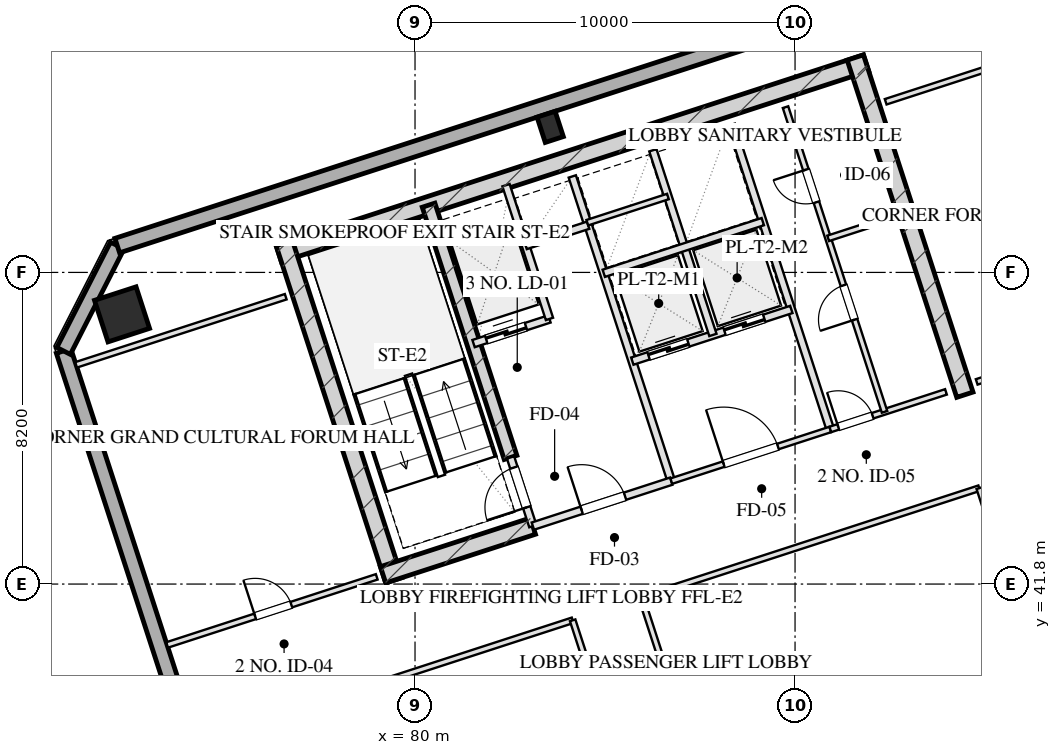
"""IFC4 building model, lengths in metres.
Left out: names, types, materials, properties, quantities, classifications, styles, units other than length and angle.
Written with IfcOpenShell. Run it as: python <this file> out.ifc"""

import sys

from ifc_helpers import new_model, si_unit, direction, frame, frame_2d, origin, origin_2d, place, context, subcontext, project, spatial, rectangle, hollow_rectangle, extrude, element, fill, save


model = new_model("IFC4")
c1 = context("Model", 3, precision=1e-05, world=origin(), true_north=direction((0.0, 1.0)))
c2 = subcontext(c1, "Body", "Model", "MODEL_VIEW")
j1 = project(units=[si_unit("LENGTHUNIT", "METRE"), si_unit("PLANEANGLEUNIT", "RADIAN")], contexts=[c1])
p1 = place(None, origin())
s1 = spatial("IfcSite", under=j1, at=p1, CompositionType="ELEMENT")
p2 = place(p1, origin())
s2 = spatial("IfcBuilding", under=s1, at=p2, CompositionType="ELEMENT")
p3 = place(p2, frame((0.0, 0.0, 198.95)))
s3 = spatial("IfcBuildingStorey", under=s2, at=p3, CompositionType="ELEMENT", Elevation=198.95)
p4 = place(p3, frame((76.415, 50.489, 0.0), z_axis=(0.0, 0.0, 1.0), x_axis=(0.951056810414, 0.309016089169, 0.0)))
e1 = element("IfcWall", 1, at=p4, inside=s3, PredefinedType="SHEAR", context=c2, shape_type="SweptSolid", body=[
    extrude(rectangle(XDim=16.25, YDim=0.45, at=frame_2d((8.125, 0.0))), origin(), (0.0, 0.0, 1.0), 3.45),
])
for number, where, z_axis, x_axis in (
    (2, (79.442, 41.899, 0.0), (0.0, 0.0, 1.0), (-0.309, 0.951, 0.0)),
    (3, (94.469, 46.781, 0.0), (0.0, 0.0, 1.0), (-0.309, 0.951, 0.0)),
):
    element("IfcWall", number, at=place(p3, frame(where, z_axis=z_axis, x_axis=x_axis)), inside=s3, PredefinedType="SHEAR", context=c2, shape_type="SweptSolid", body=[
        extrude(rectangle(XDim=9.33, YDim=0.45, at=frame_2d((4.665, 0.0))), origin(), (0.0, 0.0, 1.0), 3.45),
    ])
p5 = place(p3, frame((82.514, 45.131, 0.0), z_axis=(0.0, 0.0, 1.0), x_axis=(-0.308988790936, 0.951065679686, 0.0)))
e4 = element("IfcWall", 4, at=p5, inside=s3, PredefinedType="SHEAR", context=c2, shape_type="SweptSolid", body=[
    extrude(rectangle(XDim=6.98, YDim=0.35, at=frame_2d((3.49, 0.0))), origin(), (0.0, 0.0, 1.0), 3.45),
])
p6 = place(p3, frame((79.159, 42.043, 0.0), z_axis=(0.0, 0.0, 1.0), x_axis=(0.951047485828, 0.309044785913, 0.0)))
e5 = element("IfcWall", 5, at=p6, inside=s3, PredefinedType="SHEAR", context=c2, shape_type="SweptSolid", body=[
    extrude(rectangle(XDim=4.145, YDim=0.45, at=frame_2d((2.073, 0.0))), origin(), (0.0, 0.0, 1.0), 3.45),
])
for number, where, z_axis, x_axis in (
    (6, (95.572, 56.461, 0.0), (0.0, 0.0, 1.0), (0.951, 0.309, 0.0)),
    (7, (72.29, 48.896, 0.0), (0.0, 0.0, 1.0), (0.951, 0.309, 0.0)),
):
    element("IfcColumn", number, at=place(p3, frame(where, z_axis=z_axis, x_axis=x_axis)), inside=s3, PredefinedType="COLUMN", context=c2, shape_type="SweptSolid", body=[
        extrude(hollow_rectangle(XDim=1.15, YDim=1.15, WallThickness=0.04, at=origin_2d()), origin(), (0.0, 0.0, 1.0), 3.451),
    ])
p7 = place(p3, frame((83.557, 53.83, 0.0), z_axis=(0.0, 0.0, 1.0), x_axis=(0.951056516295, 0.309016994375, 0.0)))
e8 = element("IfcColumn", 8, at=p7, inside=s3, PredefinedType="COLUMN", context=c2, shape_type="SweptSolid", body=[
    extrude(hollow_rectangle(XDim=0.5, YDim=0.7, WallThickness=0.025, at=origin_2d()), origin(), (0.0, 0.0, 1.0), 3.451),
])
p8 = place(p3, frame((82.618, 11.414, 0.0), z_axis=(0.0, 0.0, 1.0), x_axis=(-0.309016491071, 0.951056679828, 0.0)))
e9 = element("IfcWall", 9, at=p8, inside=s3, PredefinedType="SOLIDWALL", context=c2, shape_type="SweptSolid", body=[
    extrude(rectangle(XDim=38.4, YDim=0.4, at=frame_2d((19.2, 0.0))), origin(), (0.0, 0.0, 1.0), 2.61),
])
p9 = place(p8, frame((11.75, 0.0, 0.75)))
e10 = element("IfcOpeningElement", 10, at=p9, cuts=e9, PredefinedType="OPENING", context=c2, shape_type="SweptSolid", body=[
    extrude(rectangle(XDim=2.1, YDim=1.46, at=frame_2d((1.05, 0.73))), frame((0.0, 0.21, 0.0), z_axis=(0.0, -1.0, 0.0), x_axis=(1.0, 0.0, 0.0)), (0.0, 0.0, 1.0), 0.42),
])
p10 = place(p8, frame((15.55, 0.0, 0.75)))
e11 = element("IfcOpeningElement", 11, at=p10, cuts=e9, PredefinedType="OPENING", context=c2, shape_type="SweptSolid", body=[
    extrude(rectangle(XDim=2.1, YDim=1.46, at=frame_2d((1.05, 0.73))), frame((0.0, 0.21, 0.0), z_axis=(0.0, -1.0, 0.0), x_axis=(1.0, 0.0, 0.0)), (0.0, 0.0, 1.0), 0.42),
])
p11 = place(p8, frame((23.05, 0.0, 0.0)))
e12 = element("IfcOpeningElement", 12, at=p11, cuts=e9, PredefinedType="OPENING", context=c2, shape_type="SweptSolid", body=[
    extrude(rectangle(XDim=1.1, YDim=2.15, at=frame_2d((0.55, 1.075))), frame((0.0, 0.21, 0.0), z_axis=(0.0, -1.0, 0.0), x_axis=(1.0, 0.0, 0.0)), (0.0, 0.0, 1.0), 0.42),
])
p12 = place(p3, frame((70.752, 47.934, 0.0), z_axis=(0.0, 0.0, 1.0), x_axis=(0.453949291228, 0.891027519774, 0.0)))
e13 = element("IfcWall", 13, at=p12, inside=s3, PredefinedType="SOLIDWALL", context=c2, shape_type="SweptSolid", body=[
    extrude(rectangle(XDim=3.111, YDim=0.4, at=frame_2d((1.556, 0.0))), origin(), (0.0, 0.0, 1.0), 2.61),
])
p13 = place(p3, frame((72.165, 50.706, 0.0), z_axis=(0.0, 0.0, 1.0), x_axis=(0.951058012937, 0.309012388148, 0.0)))
e14 = element("IfcWall", 14, at=p13, inside=s3, PredefinedType="SOLIDWALL", context=c2, shape_type="SweptSolid", body=[
    extrude(rectangle(XDim=23.6, YDim=0.4, at=frame_2d((11.8, 0.0))), origin(), (0.0, 0.0, 1.0), 2.61),
])
p14 = place(p3, frame((83.101, 43.324, 0.0), z_axis=(0.0, 0.0, 1.0), x_axis=(-0.309048298632, 0.951046344356, 0.0)))
e15 = element("IfcWall", 15, at=p14, inside=s3, PredefinedType="PARTITIONING", context=c2, shape_type="SweptSolid", body=[
    extrude(rectangle(XDim=1.9, YDim=0.2, at=frame_2d((0.95, 0.0))), origin(), (0.0, 0.0, 1.0), 3.175),
])
p15 = place(p14, frame((0.52, 0.0, 0.0)))
e16 = element("IfcOpeningElement", 16, at=p15, cuts=e15, PredefinedType="OPENING", context=c2, shape_type="SweptSolid", body=[
    extrude(rectangle(XDim=1.1, YDim=2.05, at=frame_2d((0.55, 1.025))), frame((0.0, 0.11, 0.0), z_axis=(0.0, -1.0, 0.0), x_axis=(1.0, 0.0, 0.0)), (0.0, 0.0, 1.0), 0.22),
])
p16 = place(p3, frame((86.743, 44.508, 0.0), z_axis=(0.0, 0.0, 1.0), x_axis=(-0.309016001439, 0.951056838919, 0.0)))
e17 = element("IfcWall", 17, at=p16, inside=s3, PredefinedType="PARTITIONING", context=c2, shape_type="SweptSolid", body=[
    extrude(rectangle(XDim=8.43, YDim=0.2, at=frame_2d((4.215, 0.0))), origin(), (0.0, 0.0, 1.0), 3.175),
])
p17 = place(p3, frame((83.101, 43.324, 0.0), z_axis=(0.0, 0.0, 1.0), x_axis=(0.951052804469, 0.309028417967, 0.0)))
e18 = element("IfcWall", 18, at=p17, inside=s3, PredefinedType="PARTITIONING", context=c2, shape_type="SweptSolid", body=[
    extrude(rectangle(XDim=3.83, YDim=0.2, at=frame_2d((1.915, 0.0))), origin(), (0.0, 0.0, 1.0), 3.175),
])
p18 = place(p17, frame((1.35, 0.0, 0.0)))
e19 = element("IfcOpeningElement", 19, at=p18, cuts=e18, PredefinedType="OPENING", context=c2, shape_type="SweptSolid", body=[
    extrude(rectangle(XDim=1.2, YDim=2.05, at=frame_2d((0.6, 1.025))), frame((0.0, 0.11, 0.0), z_axis=(0.0, -1.0, 0.0), x_axis=(1.0, 0.0, 0.0)), (0.0, 0.0, 1.0), 0.22),
])
p19 = place(p3, frame((81.54, 48.127, 0.0), z_axis=(0.0, 0.0, 1.0), x_axis=(0.951062257173, 0.308999325213, 0.0)))
e20 = element("IfcWall", 20, at=p19, inside=s3, PredefinedType="PARTITIONING", context=c2, shape_type="SweptSolid", body=[
    extrude(rectangle(XDim=2.1, YDim=0.2, at=frame_2d((1.05, 0.0))), origin(), (0.0, 0.0, 1.0), 3.175),
])
p20 = place(p19, frame((0.35, 0.0, 0.0)))
e21 = element("IfcOpeningElement", 21, at=p20, cuts=e20, PredefinedType="OPENING", context=c2, shape_type="SweptSolid", body=[
    extrude(rectangle(XDim=1.1, YDim=2.05, at=frame_2d((0.55, 1.025))), frame((0.0, 0.11, 0.0), z_axis=(0.0, -1.0, 0.0), x_axis=(1.0, 0.0, 0.0)), (0.0, 0.0, 1.0), 0.22),
])
p21 = place(p3, frame((83.538, 48.776, 0.0), z_axis=(0.0, 0.0, 1.0), x_axis=(-0.3089935693, 0.951064127245, 0.0)))
e22 = element("IfcWall", 22, at=p21, inside=s3, PredefinedType="PARTITIONING", context=c2, shape_type="SweptSolid", body=[
    extrude(rectangle(XDim=3.7, YDim=0.2, at=frame_2d((1.85, 0.0))), origin(), (0.0, 0.0, 1.0), 3.175),
])
p22 = place(p3, frame((82.91, 50.707, 0.0), z_axis=(0.0, 0.0, 1.0), x_axis=(0.951041328149, 0.309063734775, 0.0)))
e23 = element("IfcWall", 23, at=p22, inside=s3, PredefinedType="PARTITIONING", context=c2, shape_type="SweptSolid", body=[
    extrude(rectangle(XDim=1.73, YDim=0.2, at=frame_2d((0.865, 0.0))), origin(), (0.0, 0.0, 1.0), 3.175),
])
p23 = place(p3, frame((90.928, 45.868, 0.0), z_axis=(0.0, 0.0, 1.0), x_axis=(-0.309042196757, 0.951048327176, 0.0)))
e24 = element("IfcWall", 24, at=p23, inside=s3, PredefinedType="PARTITIONING", context=c2, shape_type="SweptSolid", body=[
    extrude(rectangle(XDim=8.43, YDim=0.2, at=frame_2d((4.215, 0.0))), origin(), (0.0, 0.0, 1.0), 3.175),
])
p24 = place(p3, frame((86.743, 44.508, 0.0), z_axis=(0.0, 0.0, 1.0), x_axis=(0.951063829732, 0.308994485023, 0.0)))
e25 = element("IfcWall", 25, at=p24, inside=s3, PredefinedType="PARTITIONING", context=c2, shape_type="SweptSolid", body=[
    extrude(rectangle(XDim=4.4, YDim=0.15, at=frame_2d((2.2, 0.0))), origin(), (0.0, 0.0, 1.0), 3.175),
])
p25 = place(p24, frame((1.45, 0.0, 0.0)))
e26 = element("IfcOpeningElement", 26, at=p25, cuts=e25, PredefinedType="OPENING", context=c2, shape_type="SweptSolid", body=[
    extrude(rectangle(XDim=1.5, YDim=2.05, at=frame_2d((0.75, 1.025))), frame((0.0, 0.085, 0.0), z_axis=(0.0, -1.0, 0.0), x_axis=(1.0, 0.0, 0.0)), (0.0, 0.0, 1.0), 0.17),
])
p26 = place(p3, frame((85.718, 47.666, 0.0), z_axis=(0.0, 0.0, 1.0), x_axis=(0.951058531764, 0.30901079133, 0.0)))
e27 = element("IfcWall", 27, at=p26, inside=s3, PredefinedType="PARTITIONING", context=c2, shape_type="SweptSolid", body=[
    extrude(rectangle(XDim=4.4, YDim=0.2, at=frame_2d((2.2, 0.0))), origin(), (0.0, 0.0, 1.0), 3.175),
])
p27 = place(p26, frame((0.45, 0.0, 0.0)))
e28 = element("IfcOpeningElement", 28, at=p27, cuts=e27, PredefinedType="OPENING", context=c2, shape_type="SweptSolid", body=[
    extrude(rectangle(XDim=1.1, YDim=2.05, at=frame_2d((0.55, 1.025))), frame((0.0, 0.11, 0.0), z_axis=(0.0, -1.0, 0.0), x_axis=(1.0, 0.0, 0.0)), (0.0, 0.0, 1.0), 0.22),
])
p28 = place(p26, frame((2.55, 0.0, 0.0)))
e29 = element("IfcOpeningElement", 29, at=p28, cuts=e27, PredefinedType="OPENING", context=c2, shape_type="SweptSolid", body=[
    extrude(rectangle(XDim=1.1, YDim=2.05, at=frame_2d((0.55, 1.025))), frame((0.0, 0.11, 0.0), z_axis=(0.0, -1.0, 0.0), x_axis=(1.0, 0.0, 0.0)), (0.0, 0.0, 1.0), 0.22),
])
p29 = place(p3, frame((87.838, 48.354, 0.0), z_axis=(0.0, 0.0, 1.0), x_axis=(-0.3090093719, 0.951058992953, 0.0)))
e30 = element("IfcWall", 30, at=p29, inside=s3, PredefinedType="PARTITIONING", context=c2, shape_type="SweptSolid", body=[
    extrude(rectangle(XDim=5.11, YDim=0.2, at=frame_2d((2.555, 0.0))), origin(), (0.0, 0.0, 1.0), 3.175),
])
p30 = place(p3, frame((84.967, 49.977, 0.0), z_axis=(0.0, 0.0, 1.0), x_axis=(0.951063829732, 0.308994485023, 0.0)))
e31 = element("IfcWall", 31, at=p30, inside=s3, PredefinedType="PARTITIONING", context=c2, shape_type="SweptSolid", body=[
    extrude(rectangle(XDim=4.4, YDim=0.2, at=frame_2d((2.2, 0.0))), origin(), (0.0, 0.0, 1.0), 3.175),
])
p31 = place(p3, frame((84.534, 51.308, 0.0), z_axis=(0.0, 0.0, 1.0), x_axis=(0.951075093106, 0.308959814982, 0.0)))
e32 = element("IfcWall", 32, at=p31, inside=s3, PredefinedType="PARTITIONING", context=c2, shape_type="SweptSolid", body=[
    extrude(rectangle(XDim=2.23, YDim=0.15, at=frame_2d((1.115, 0.0))), origin(), (0.0, 0.0, 1.0), 3.175),
])
p32 = place(p3, frame((90.928, 45.868, 0.0), z_axis=(0.0, 0.0, 1.0), x_axis=(0.951059297078, 0.309008435874, 0.0)))
e33 = element("IfcWall", 33, at=p32, inside=s3, PredefinedType="PARTITIONING", context=c2, shape_type="SweptSolid", body=[
    extrude(rectangle(XDim=3.2, YDim=0.15, at=frame_2d((1.6, 0.0))), origin(), (0.0, 0.0, 1.0), 3.175),
])
p33 = place(p32, frame((0.22, 0.0, 0.0)))
e34 = element("IfcOpeningElement", 34, at=p33, cuts=e33, PredefinedType="OPENING", context=c2, shape_type="SweptSolid", body=[
    extrude(rectangle(XDim=0.95, YDim=2.05, at=frame_2d((0.475, 1.025))), frame((0.0, 0.085, 0.0), z_axis=(0.0, -1.0, 0.0), x_axis=(1.0, 0.0, 0.0)), (0.0, 0.0, 1.0), 0.17),
])
p34 = place(p3, frame((92.355, 46.331, 0.0), z_axis=(0.0, 0.0, 1.0), x_axis=(-0.309007490203, 0.951059604335, 0.0)))
e35 = element("IfcWall", 35, at=p34, inside=s3, PredefinedType="PARTITIONING", context=c2, shape_type="SweptSolid", body=[
    extrude(rectangle(XDim=8.43, YDim=0.15, at=frame_2d((4.215, 0.0))), origin(), (0.0, 0.0, 1.0), 3.175),
])
p35 = place(p34, frame((2.55, 0.0, 0.0)))
e36 = element("IfcOpeningElement", 36, at=p35, cuts=e35, PredefinedType="OPENING", context=c2, shape_type="SweptSolid", body=[
    extrude(rectangle(XDim=0.95, YDim=2.05, at=frame_2d((0.475, 1.025))), frame((0.0, 0.085, 0.0), z_axis=(0.0, -1.0, 0.0), x_axis=(1.0, 0.0, 0.0)), (0.0, 0.0, 1.0), 0.17),
])
p36 = place(p34, frame((5.8, 0.0, 0.0)))
e37 = element("IfcOpeningElement", 37, at=p36, cuts=e35, PredefinedType="OPENING", context=c2, shape_type="SweptSolid", body=[
    extrude(rectangle(XDim=0.9, YDim=2.05, at=frame_2d((0.45, 1.025))), frame((0.0, 0.085, 0.0), z_axis=(0.0, -1.0, 0.0), x_axis=(1.0, 0.0, 0.0)), (0.0, 0.0, 1.0), 0.17),
])
p37 = place(p3, frame((90.871, 50.896, 0.0), z_axis=(0.0, 0.0, 1.0), x_axis=(0.951054116971, 0.309024378638, 0.0)))
e38 = element("IfcWall", 38, at=p37, inside=s3, PredefinedType="PARTITIONING", context=c2, shape_type="SweptSolid", body=[
    extrude(rectangle(XDim=1.7, YDim=0.15, at=frame_2d((0.85, 0.0))), origin(), (0.0, 0.0, 1.0), 3.175),
])
p38 = place(p3, frame((71.081, 47.568, 0.0), z_axis=(0.0, 0.0, 1.0), x_axis=(0.951059431056, 0.309008023519, 0.0)))
e39 = element("IfcWall", 39, at=p38, inside=s3, PredefinedType="PARTITIONING", context=c2, shape_type="SweptSolid", body=[
    extrude(rectangle(XDim=5.8, YDim=0.15, at=frame_2d((2.9, 0.0))), origin(), (0.0, 0.0, 1.0), 3.175),
])
p39 = place(p3, frame((73.476, 40.197, 0.0), z_axis=(0.0, 0.0, 1.0), x_axis=(0.951059431056, 0.309008023519, 0.0)))
e40 = element("IfcWall", 40, at=p39, inside=s3, PredefinedType="PARTITIONING", context=c2, shape_type="SweptSolid", body=[
    extrude(rectangle(XDim=5.8, YDim=0.15, at=frame_2d((2.9, 0.0))), origin(), (0.0, 0.0, 1.0), 3.175),
])
p40 = place(p39, frame((2.436, 0.0, 0.0)))
e41 = element("IfcOpeningElement", 41, at=p40, cuts=e40, PredefinedType="OPENING", context=c2, shape_type="SweptSolid", body=[
    extrude(rectangle(XDim=1.0, YDim=2.05, at=frame_2d((0.5, 1.025))), frame((0.0, 0.085, 0.0), z_axis=(0.0, -1.0, 0.0), x_axis=(1.0, 0.0, 0.0)), (0.0, 0.0, 1.0), 0.17),
])
p41 = place(p3, frame((92.385, 54.49, 0.0), z_axis=(0.0, 0.0, 1.0), x_axis=(0.951055112834, 0.309021313752, 0.0)))
e42 = element("IfcWall", 42, at=p41, inside=s3, PredefinedType="PARTITIONING", context=c2, shape_type="SweptSolid", body=[
    extrude(rectangle(XDim=5.2, YDim=0.15, at=frame_2d((2.6, 0.0))), origin(), (0.0, 0.0, 1.0), 3.175),
])
p42 = place(p3, frame((94.78, 47.119, 0.0), z_axis=(0.0, 0.0, 1.0), x_axis=(0.951055112834, 0.309021313752, 0.0)))
e43 = element("IfcWall", 43, at=p42, inside=s3, PredefinedType="PARTITIONING", context=c2, shape_type="SweptSolid", body=[
    extrude(rectangle(XDim=5.2, YDim=0.15, at=frame_2d((2.6, 0.0))), origin(), (0.0, 0.0, 1.0), 3.175),
])
p43 = place(p42, frame((2.184, 0.0, 0.0)))
e44 = element("IfcOpeningElement", 44, at=p43, cuts=e43, PredefinedType="OPENING", context=c2, shape_type="SweptSolid", body=[
    extrude(rectangle(XDim=1.0, YDim=2.05, at=frame_2d((0.5, 1.025))), frame((0.0, 0.085, 0.0), z_axis=(0.0, -1.0, 0.0), x_axis=(1.0, 0.0, 0.0)), (0.0, 0.0, 1.0), 0.17),
])
p44 = place(p3, frame((74.304, 37.648, 0.0), z_axis=(0.0, 0.0, 1.0), x_axis=(0.951059547341, 0.309007665621, 0.0)))
e45 = element("IfcWall", 45, at=p44, inside=s3, PredefinedType="PARTITIONING", context=c2, shape_type="SweptSolid", body=[
    extrude(rectangle(XDim=10.35, YDim=0.15, at=frame_2d((5.175, 0.0))), origin(), (0.0, 0.0, 1.0), 3.175),
])
p45 = place(p3, frame((85.955, 41.434, 0.0), z_axis=(0.0, 0.0, 1.0), x_axis=(0.951053063704, 0.309027620156, 0.0)))
e46 = element("IfcWall", 46, at=p45, inside=s3, PredefinedType="PARTITIONING", context=c2, shape_type="SweptSolid", body=[
    extrude(rectangle(XDim=9.35, YDim=0.15, at=frame_2d((4.675, 0.0))), origin(), (0.0, 0.0, 1.0), 3.175),
])
p46 = place(p3, frame((89.29, 25.021, 0.0), z_axis=(0.0, 0.0, 1.0), x_axis=(-0.309004459387, 0.951060589068, 0.0)))
e47 = element("IfcWall", 47, at=p46, inside=s3, PredefinedType="PARTITIONING", context=c2, shape_type="SweptSolid", body=[
    extrude(rectangle(XDim=16.64, YDim=0.15, at=frame_2d((8.32, 0.0))), origin(), (0.0, 0.0, 1.0), 3.175),
])
p47 = place(p46, frame((3.107, 0.0, 0.0)))
e48 = element("IfcOpeningElement", 48, at=p47, cuts=e47, PredefinedType="OPENING", context=c2, shape_type="SweptSolid", body=[
    extrude(rectangle(XDim=1.05, YDim=2.05, at=frame_2d((0.525, 1.025))), frame((0.0, 0.085, 0.0), z_axis=(0.0, -1.0, 0.0), x_axis=(1.0, 0.0, 0.0)), (0.0, 0.0, 1.0), 0.17),
])
p48 = place(p46, frame((11.427, 0.0, 0.0)))
e49 = element("IfcOpeningElement", 49, at=p48, cuts=e47, PredefinedType="OPENING", context=c2, shape_type="SweptSolid", body=[
    extrude(rectangle(XDim=1.0, YDim=2.05, at=frame_2d((0.5, 1.025))), frame((0.0, 0.085, 0.0), z_axis=(0.0, -1.0, 0.0), x_axis=(1.0, 0.0, 0.0)), (0.0, 0.0, 1.0), 0.17),
])
p49 = place(p3, frame((91.097, 25.608, 0.0), z_axis=(0.0, 0.0, 1.0), x_axis=(-0.30901773025, 0.951056277195, 0.0)))
e50 = element("IfcWall", 50, at=p49, inside=s3, PredefinedType="PARTITIONING", context=c2, shape_type="SweptSolid", body=[
    extrude(rectangle(XDim=16.64, YDim=0.15, at=frame_2d((8.32, 0.0))), origin(), (0.0, 0.0, 1.0), 3.175),
])
p50 = place(p49, frame((7.987, 0.0, 0.0)))
e51 = element("IfcOpeningElement", 51, at=p50, cuts=e50, PredefinedType="OPENING", context=c2, shape_type="SweptSolid", body=[
    extrude(rectangle(XDim=1.1, YDim=2.05, at=frame_2d((0.55, 1.025))), frame((0.0, 0.085, 0.0), z_axis=(0.0, -1.0, 0.0), x_axis=(1.0, 0.0, 0.0)), (0.0, 0.0, 1.0), 0.17),
])
p51 = place(p3, frame((99.989, 28.498, 0.0), z_axis=(0.0, 0.0, 1.0), x_axis=(-0.30901773025, 0.951056277195, 0.0)))
e52 = element("IfcWall", 52, at=p51, inside=s3, PredefinedType="PARTITIONING", context=c2, shape_type="SweptSolid", body=[
    extrude(rectangle(XDim=16.64, YDim=0.15, at=frame_2d((8.32, 0.0))), origin(), (0.0, 0.0, 1.0), 3.175),
])
p52 = place(p15, origin())
e53 = element("IfcDoor", 53, at=p52, inside=s3, OperationType="SINGLE_SWING_LEFT", PredefinedType="DOOR", context=c2, shape_type="SweptSolid", body=[
    extrude(rectangle(XDim=1.1, YDim=2.05, at=frame_2d((0.55, 1.025))), frame((0.0, 0.025, 0.0), z_axis=(0.0, -1.0, 0.0), x_axis=(1.0, 0.0, 0.0)), (0.0, 0.0, 1.0), 0.05),
])
fill(e16, e53)
p53 = place(p18, origin())
e54 = element("IfcDoor", 54, at=p53, inside=s3, OperationType="SINGLE_SWING_LEFT", PredefinedType="DOOR", context=c2, shape_type="SweptSolid", body=[
    extrude(rectangle(XDim=1.2, YDim=2.05, at=frame_2d((0.6, 1.025))), frame((0.0, 0.025, 0.0), z_axis=(0.0, -1.0, 0.0), x_axis=(1.0, 0.0, 0.0)), (0.0, 0.0, 1.0), 0.05),
])
fill(e19, e54)
p54 = place(p20, origin())
e55 = element("IfcDoor", 55, at=p54, inside=s3, OperationType="DOUBLE_DOOR_SLIDING", PredefinedType="DOOR", context=c2, shape_type="SweptSolid", body=[
    extrude(rectangle(XDim=1.1, YDim=2.05, at=frame_2d((0.55, 1.025))), frame((0.0, 0.025, 0.0), z_axis=(0.0, -1.0, 0.0), x_axis=(1.0, 0.0, 0.0)), (0.0, 0.0, 1.0), 0.05),
])
fill(e21, e55)
p55 = place(p25, origin())
e56 = element("IfcDoor", 56, at=p55, inside=s3, OperationType="SINGLE_SWING_LEFT", PredefinedType="DOOR", context=c2, shape_type="SweptSolid", body=[
    extrude(rectangle(XDim=1.5, YDim=2.05, at=frame_2d((0.75, 1.025))), frame((0.0, 0.025, 0.0), z_axis=(0.0, -1.0, 0.0), x_axis=(1.0, 0.0, 0.0)), (0.0, 0.0, 1.0), 0.05),
])
fill(e26, e56)
p56 = place(p27, origin())
e57 = element("IfcDoor", 57, at=p56, inside=s3, OperationType="DOUBLE_DOOR_SLIDING", PredefinedType="DOOR", context=c2, shape_type="SweptSolid", body=[
    extrude(rectangle(XDim=1.1, YDim=2.05, at=frame_2d((0.55, 1.025))), frame((0.0, 0.025, 0.0), z_axis=(0.0, -1.0, 0.0), x_axis=(1.0, 0.0, 0.0)), (0.0, 0.0, 1.0), 0.05),
])
fill(e28, e57)
p57 = place(p28, origin())
e58 = element("IfcDoor", 58, at=p57, inside=s3, OperationType="DOUBLE_DOOR_SLIDING", PredefinedType="DOOR", context=c2, shape_type="SweptSolid", body=[
    extrude(rectangle(XDim=1.1, YDim=2.05, at=frame_2d((0.55, 1.025))), frame((0.0, 0.025, 0.0), z_axis=(0.0, -1.0, 0.0), x_axis=(1.0, 0.0, 0.0)), (0.0, 0.0, 1.0), 0.05),
])
fill(e29, e58)
p58 = place(p33, origin())
e59 = element("IfcDoor", 59, at=p58, inside=s3, OperationType="SINGLE_SWING_LEFT", PredefinedType="DOOR", context=c2, shape_type="SweptSolid", body=[
    extrude(rectangle(XDim=0.95, YDim=2.05, at=frame_2d((0.475, 1.025))), frame((0.0, 0.025, 0.0), z_axis=(0.0, -1.0, 0.0), x_axis=(1.0, 0.0, 0.0)), (0.0, 0.0, 1.0), 0.05),
])
fill(e34, e59)
p59 = place(p35, origin())
e60 = element("IfcDoor", 60, at=p59, inside=s3, OperationType="SINGLE_SWING_LEFT", PredefinedType="DOOR", context=c2, shape_type="SweptSolid", body=[
    extrude(rectangle(XDim=0.95, YDim=2.05, at=frame_2d((0.475, 1.025))), frame((0.0, 0.025, 0.0), z_axis=(0.0, -1.0, 0.0), x_axis=(1.0, 0.0, 0.0)), (0.0, 0.0, 1.0), 0.05),
])
fill(e36, e60)
p60 = place(p36, origin())
e61 = element("IfcDoor", 61, at=p60, inside=s3, OperationType="SINGLE_SWING_RIGHT", PredefinedType="DOOR", context=c2, shape_type="SweptSolid", body=[
    extrude(rectangle(XDim=0.9, YDim=2.05, at=frame_2d((0.45, 1.025))), frame((0.0, 0.025, 0.0), z_axis=(0.0, -1.0, 0.0), x_axis=(1.0, 0.0, 0.0)), (0.0, 0.0, 1.0), 0.05),
])
fill(e37, e61)
p61 = place(p40, origin())
e62 = element("IfcDoor", 62, at=p61, inside=s3, OperationType="SINGLE_SWING_LEFT", PredefinedType="DOOR", context=c2, shape_type="SweptSolid", body=[
    extrude(rectangle(XDim=1.0, YDim=2.05, at=frame_2d((0.5, 1.025))), frame((0.0, 0.025, 0.0), z_axis=(0.0, -1.0, 0.0), x_axis=(1.0, 0.0, 0.0)), (0.0, 0.0, 1.0), 0.05),
])
fill(e41, e62)
save(model, sys.argv[1])
